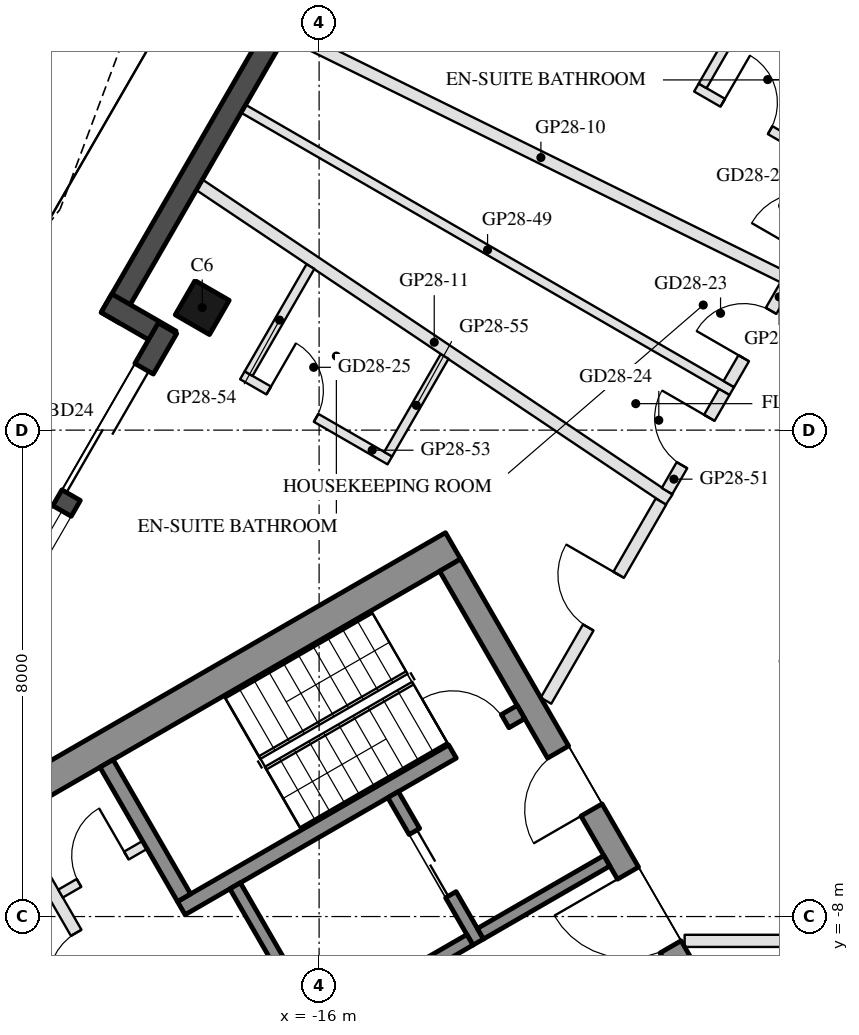
"""IFC4 building model, lengths in metres.
Left out: names, types, materials, properties, quantities, classifications, styles, units other than length and angle.
Written with IfcOpenShell. Run it as: python <this file> out.ifc"""

import sys

from ifc_helpers import new_model, si_unit, direction, frame, frame_2d, origin, origin_2d, place, context, subcontext, project, spatial, rectangle, hollow_rectangle, extrude, boolean, halfspace, element, fill, save


model = new_model("IFC4")
c1 = context("Model", 3, precision=1e-05, world=origin(), true_north=direction((0.0, 1.0)))
c2 = subcontext(c1, "Body", "Model", "MODEL_VIEW")
j1 = project(units=[si_unit("LENGTHUNIT", "METRE"), si_unit("PLANEANGLEUNIT", "RADIAN")], contexts=[c1])
p1 = place(None, origin())
s1 = spatial("IfcSite", under=j1, at=p1, CompositionType="ELEMENT")
p2 = place(p1, origin())
s2 = spatial("IfcBuilding", under=s1, at=p2, CompositionType="ELEMENT")
p3 = place(p2, frame((0.0, 0.0, 280.0)))
s3 = spatial("IfcBuildingStorey", under=s2, at=p3, CompositionType="ELEMENT", Elevation=280.0)
p4 = place(p3, frame((-17.922, 2.016, 0.0), z_axis=(0.0, 0.0, 1.0), x_axis=(0.5, 0.866025403784, 0.0)))
e1 = element("IfcColumn", 1, at=p4, inside=s3, PredefinedType="COLUMN", context=c2, shape_type="SweptSolid", body=[
    boolean("DIFFERENCE", extrude(hollow_rectangle(XDim=0.65, YDim=0.65, WallThickness=0.03, at=origin_2d()), origin(), (0.0, 0.0, 1.0), 3.7), halfspace(frame((0.0, 0.0, 0.04), z_axis=(0.0, 0.0, 1.0), x_axis=(1.0, 0.0, 0.0)), True)),
])
p5 = place(p3, frame((-14.925, 9.656, 0.0), z_axis=(0.0, 0.0, 1.0), x_axis=(-0.500018599098, -0.866014665324, 0.0)))
e2 = element("IfcWall", 2, at=p5, inside=s3, PredefinedType="SOLIDWALL", context=c2, shape_type="SweptSolid", body=[
    extrude(rectangle(XDim=9.015, YDim=0.35, at=frame_2d((4.508, 0.0))), origin(), (0.0, 0.0, 1.0), 3.55),
])
p6 = place(p5, frame((1.613, 0.0, 0.0)))
e3 = element("IfcOpeningElement", 3, at=p6, cuts=e2, PredefinedType="OPENING", context=c2, shape_type="SweptSolid", body=[
    extrude(rectangle(XDim=1.4, YDim=2.4, at=frame_2d((0.7, 1.2))), frame((0.0, 0.185, 0.0), z_axis=(0.0, -1.0, 0.0), x_axis=(1.0, 0.0, 0.0)), (0.0, 0.0, 1.0), 0.37),
])
p7 = place(p3, frame((-19.497, 2.088, 0.0), z_axis=(0.0, 0.0, 1.0), x_axis=(0.866005645448, -0.500034220881, 0.0)))
e4 = element("IfcWall", 4, at=p7, inside=s3, PredefinedType="SOLIDWALL", context=c2, shape_type="SweptSolid", body=[
    extrude(rectangle(XDim=1.22, YDim=0.35, at=frame_2d((0.61, 0.0))), origin(), (0.0, 0.0, 1.0), 3.55),
])
p8 = place(p3, frame((-18.493, 1.676, 0.0), z_axis=(0.0, 0.0, 1.0), x_axis=(-0.499985371027, -0.866033849661, 0.0)))
e5 = element("IfcWall", 5, at=p8, inside=s3, PredefinedType="SOLIDWALL", context=c2, shape_type="SweptSolid", body=[
    extrude(rectangle(XDim=6.055, YDim=0.35, at=frame_2d((3.028, 0.0))), origin(), (0.0, 0.0, 1.0), 3.55),
])
p9 = place(p8, frame((0.77, 0.0, 0.0)))
e6 = element("IfcOpeningElement", 6, at=p9, cuts=e5, PredefinedType="OPENING", context=c2, shape_type="SweptSolid", body=[
    extrude(rectangle(XDim=2.4, YDim=2.4, at=frame_2d((1.2, 1.2))), frame((0.0, 0.185, 0.0), z_axis=(0.0, -1.0, 0.0), x_axis=(1.0, 0.0, 0.0)), (0.0, 0.0, 1.0), 0.37),
])
p10 = place(p8, frame((3.47, 0.0, 0.3)))
e7 = element("IfcOpeningElement", 7, at=p10, cuts=e5, PredefinedType="OPENING", context=c2, shape_type="SweptSolid", body=[
    extrude(rectangle(XDim=2.2, YDim=2.65, at=frame_2d((1.1, 1.325))), frame((0.0, 0.185, 0.0), z_axis=(0.0, -1.0, 0.0), x_axis=(1.0, 0.0, 0.0)), (0.0, 0.0, 1.0), 0.37),
])
p11 = place(p3, frame((-13.797, -1.903, 0.0), z_axis=(0.0, 0.0, 1.0), x_axis=(-0.866024688907, -0.500001238203, 0.0)))
e8 = element("IfcWall", 8, at=p11, inside=s3, PredefinedType="SHEAR", context=c2, shape_type="SweptSolid", body=[
    extrude(rectangle(XDim=12.129, YDim=0.5, at=frame_2d((6.064, 0.0))), origin(), (0.0, 0.0, 1.0), 3.5),
])
p12 = place(p3, frame((-13.845, -2.22, 0.0), z_axis=(0.0, 0.0, 1.0), x_axis=(0.500004234368, -0.866022959057, 0.0)))
e9 = element("IfcWall", 9, at=p12, inside=s3, PredefinedType="SHEAR", context=c2, shape_type="SweptSolid", body=[
    extrude(rectangle(XDim=10.0, YDim=0.4, at=frame_2d((5.0, 0.0))), origin(), (0.0, 0.0, 1.0), 3.5),
])
p13 = place(p12, frame((3.55, 0.0, 0.0)))
e10 = element("IfcOpeningElement", 10, at=p13, cuts=e9, PredefinedType="OPENING", context=c2, shape_type="SweptSolid", body=[
    extrude(rectangle(XDim=1.1, YDim=2.1, at=frame_2d((0.55, 1.05))), frame((0.0, 0.21, 0.0), z_axis=(0.0, -1.0, 0.0), x_axis=(1.0, 0.0, 0.0)), (0.0, 0.0, 1.0), 0.42),
])
p14 = place(p12, frame((5.85, 0.0, 0.0)))
e11 = element("IfcOpeningElement", 11, at=p14, cuts=e9, PredefinedType="OPENING", context=c2, shape_type="SweptSolid", body=[
    extrude(rectangle(XDim=1.4, YDim=2.1, at=frame_2d((0.7, 1.05))), frame((0.0, 0.21, 0.0), z_axis=(0.0, -1.0, 0.0), x_axis=(1.0, 0.0, 0.0)), (0.0, 0.0, 1.0), 0.42),
])
p15 = place(p3, frame((-12.681, -4.636, 0.0), z_axis=(0.0, 0.0, 1.0), x_axis=(-0.866021702275, -0.500006411147, 0.0)))
e12 = element("IfcWall", 12, at=p15, inside=s3, PredefinedType="SHEAR", context=c2, shape_type="SweptSolid", body=[
    extrude(rectangle(XDim=6.45, YDim=0.25, at=frame_2d((3.225, 0.0))), origin(), (0.0, 0.0, 1.0), 3.5),
])
p16 = place(p15, frame((0.3, 0.0, 0.0)))
e13 = element("IfcOpeningElement", 13, at=p16, cuts=e12, PredefinedType="OPENING", context=c2, shape_type="SweptSolid", body=[
    extrude(rectangle(XDim=1.0, YDim=2.1, at=frame_2d((0.5, 1.05))), frame((0.0, 0.135, 0.0), z_axis=(0.0, -1.0, 0.0), x_axis=(1.0, 0.0, 0.0)), (0.0, 0.0, 1.0), 0.27),
])
p17 = place(p3, frame((-19.496, -5.482, 0.0), z_axis=(0.0, 0.0, 1.0), x_axis=(0.499990435942, -0.866030925526, 0.0)))
e14 = element("IfcWall", 14, at=p17, inside=s3, PredefinedType="SHEAR", context=c2, shape_type="SweptSolid", body=[
    extrude(rectangle(XDim=2.55, YDim=0.25, at=frame_2d((1.275, 0.0))), origin(), (0.0, 0.0, 1.0), 3.5),
])
p18 = place(p3, frame((-17.381, -7.495, 0.0), z_axis=(0.0, 0.0, 1.0), x_axis=(0.500011755427, -0.866018616679, 0.0)))
e15 = element("IfcWall", 15, at=p18, inside=s3, PredefinedType="SHEAR", context=c2, shape_type="SweptSolid", body=[
    extrude(rectangle(XDim=2.8, YDim=0.2, at=frame_2d((1.4, 0.0))), origin(), (0.0, 0.0, 1.0), 3.5),
])
p19 = place(p3, frame((-14.783, -5.995, 0.0), z_axis=(0.0, 0.0, 1.0), x_axis=(0.49994636267, -0.866056369097, 0.0)))
e16 = element("IfcWall", 16, at=p19, inside=s3, PredefinedType="SHEAR", context=c2, shape_type="SweptSolid", body=[
    extrude(rectangle(XDim=2.8, YDim=0.2, at=frame_2d((1.4, 0.0))), origin(), (0.0, 0.0, 1.0), 3.5),
])
p20 = place(p19, frame((0.7, 0.0, 0.0)))
e17 = element("IfcOpeningElement", 17, at=p20, cuts=e16, PredefinedType="OPENING", context=c2, shape_type="SweptSolid", body=[
    extrude(rectangle(XDim=1.2, YDim=2.1, at=frame_2d((0.6, 1.05))), frame((0.0, 0.11, 0.0), z_axis=(0.0, -1.0, 0.0), x_axis=(1.0, 0.0, 0.0)), (0.0, 0.0, 1.0), 0.22),
])
p21 = place(p3, frame((-13.52, -8.383, 0.0), z_axis=(0.0, 0.0, 1.0), x_axis=(-0.866034573852, -0.49998411664, 0.0)))
e18 = element("IfcWall", 18, at=p21, inside=s3, PredefinedType="SHEAR", context=c2, shape_type="SweptSolid", body=[
    extrude(rectangle(XDim=2.8, YDim=0.2, at=frame_2d((1.4, 0.0))), origin(), (0.0, 0.0, 1.0), 3.5),
])
p22 = place(p3, frame((-11.268, -7.083, 0.0), z_axis=(0.0, 0.0, 1.0), x_axis=(-0.866050077142, -0.499957262057, 0.0)))
e19 = element("IfcWall", 19, at=p22, inside=s3, PredefinedType="SHEAR", context=c2, shape_type="SweptSolid", body=[
    extrude(rectangle(XDim=2.4, YDim=0.2, at=frame_2d((1.2, 0.0))), origin(), (0.0, 0.0, 1.0), 3.5),
])
p23 = place(p3, frame((-21.076, -6.395, 0.0), z_axis=(0.0, 0.0, 1.0), x_axis=(0.50001468107, -0.866016927499, 0.0)))
e20 = element("IfcWall", 20, at=p23, inside=s3, PredefinedType="PARTITIONING", context=c2, shape_type="SweptSolid", body=[
    extrude(rectangle(XDim=5.4, YDim=0.2, at=frame_2d((2.7, 0.0))), origin(), (0.0, 0.0, 1.0), 3.5),
])
p24 = place(p23, frame((2.163, 0.0, 0.0)))
e21 = element("IfcOpeningElement", 21, at=p24, cuts=e20, PredefinedType="OPENING", context=c2, shape_type="SweptSolid", body=[
    extrude(rectangle(XDim=0.9, YDim=2.1, at=frame_2d((0.45, 1.05))), frame((0.0, 0.11, 0.0), z_axis=(0.0, -1.0, 0.0), x_axis=(1.0, 0.0, 0.0)), (0.0, 0.0, 1.0), 0.22),
])
p25 = place(p23, frame((4.038, 0.0, 0.0)))
e22 = element("IfcOpeningElement", 22, at=p25, cuts=e20, PredefinedType="OPENING", context=c2, shape_type="SweptSolid", body=[
    extrude(rectangle(XDim=0.9, YDim=2.1, at=frame_2d((0.45, 1.05))), frame((0.0, 0.11, 0.0), z_axis=(0.0, -1.0, 0.0), x_axis=(1.0, 0.0, 0.0)), (0.0, 0.0, 1.0), 0.22),
])
p26 = place(p3, frame((-18.866, -6.822, 0.0), z_axis=(0.0, 0.0, 1.0), x_axis=(-0.866028054938, -0.499995408039, 0.0)))
e23 = element("IfcWall", 23, at=p26, inside=s3, PredefinedType="PARTITIONING", context=c2, shape_type="SweptSolid", body=[
    extrude(rectangle(XDim=1.6, YDim=0.15, at=frame_2d((0.8, 0.0))), origin(), (0.0, 0.0, 1.0), 3.5),
])
p27 = place(p26, frame((0.35, 0.0, 0.0)))
e24 = element("IfcOpeningElement", 24, at=p27, cuts=e23, PredefinedType="OPENING", context=c2, shape_type="SweptSolid", body=[
    extrude(rectangle(XDim=0.9, YDim=2.1, at=frame_2d((0.45, 1.05))), frame((0.0, 0.085, 0.0), z_axis=(0.0, -1.0, 0.0), x_axis=(1.0, 0.0, 0.0)), (0.0, 0.0, 1.0), 0.17),
])
p28 = place(p3, frame((-13.444, 10.071, 0.0), z_axis=(0.0, 0.0, 1.0), x_axis=(0.866030795796, -0.499990660646, 0.0)))
e25 = element("IfcWall", 25, at=p28, inside=s3, PredefinedType="PARTITIONING", context=c2, shape_type="SweptSolid", body=[
    extrude(rectangle(XDim=8.379, YDim=0.2, at=frame_2d((4.189, 0.0))), origin(), (0.0, 0.0, 1.0), 3.16),
])
p29 = place(p3, frame((-16.524, 6.538, 0.0), z_axis=(0.0, 0.0, 1.0), x_axis=(0.897120251728, -0.441786434762, 0.0)))
e26 = element("IfcWall", 26, at=p29, inside=s3, PredefinedType="PARTITIONING", context=c2, shape_type="SweptSolid", body=[
    extrude(rectangle(XDim=9.299, YDim=0.2, at=frame_2d((4.649, 0.0))), origin(), (0.0, 0.0, 1.0), 3.16),
])
p30 = place(p3, frame((-17.969, 4.035, 0.0), z_axis=(0.0, 0.0, 1.0), x_axis=(0.830560992963, -0.556927676604, 0.0)))
e27 = element("IfcWall", 27, at=p30, inside=s3, PredefinedType="PARTITIONING", context=c2, shape_type="SweptSolid", body=[
    extrude(rectangle(XDim=9.3, YDim=0.2, at=frame_2d((4.65, 0.0))), origin(), (0.0, 0.0, 1.0), 3.16),
])
p31 = place(p3, frame((-5.0, -8.4, 0.0), z_axis=(0.0, 0.0, 1.0), x_axis=(-1.0, 0.0, 0.0)))
e28 = element("IfcWall", 28, at=p31, inside=s3, PredefinedType="PARTITIONING", context=c2, shape_type="SweptSolid", body=[
    extrude(rectangle(XDim=4.988, YDim=0.2, at=frame_2d((2.494, 0.0))), origin(), (0.0, 0.0, 1.0), 3.05),
])
p32 = place(p31, frame((2.05, 0.0, 0.0)))
e29 = element("IfcOpeningElement", 29, at=p32, cuts=e28, PredefinedType="OPENING", context=c2, shape_type="SweptSolid", body=[
    extrude(rectangle(XDim=1.0, YDim=2.1, at=frame_2d((0.5, 1.05))), frame((0.0, 0.11, 0.0), z_axis=(0.0, -1.0, 0.0), x_axis=(1.0, 0.0, 0.0)), (0.0, 0.0, 1.0), 0.22),
])
p33 = place(p3, frame((-9.795, 5.634, 0.0), z_axis=(0.0, 0.0, 1.0), x_axis=(0.866034573852, -0.49998411664, 0.0)))
e30 = element("IfcWall", 30, at=p33, inside=s3, PredefinedType="PARTITIONING", context=c2, shape_type="SweptSolid", body=[
    extrude(rectangle(XDim=2.8, YDim=0.15, at=frame_2d((1.4, 0.0))), origin(), (0.0, 0.0, 1.0), 3.05),
])
p34 = place(p33, frame((0.5, 0.0, 0.0)))
e31 = element("IfcOpeningElement", 31, at=p34, cuts=e30, PredefinedType="OPENING", context=c2, shape_type="SweptSolid", body=[
    extrude(rectangle(XDim=0.9, YDim=2.1, at=frame_2d((0.45, 1.05))), frame((0.0, 0.085, 0.0), z_axis=(0.0, -1.0, 0.0), x_axis=(1.0, 0.0, 0.0)), (0.0, 0.0, 1.0), 0.17),
])
p35 = place(p3, frame((-8.771, 7.258, 0.0), z_axis=(0.0, 0.0, 1.0), x_axis=(-0.50002820729, -0.866009117685, 0.0)))
e32 = element("IfcWall", 32, at=p35, inside=s3, PredefinedType="PARTITIONING", context=c2, shape_type="SweptSolid", body=[
    extrude(rectangle(XDim=1.843, YDim=0.15, at=frame_2d((0.922, 0.0))), origin(), (0.0, 0.0, 1.0), 3.05),
])
p36 = place(p3, frame((-17.246, 5.286, 0.0), z_axis=(0.0, 0.0, 1.0), x_axis=(0.865746766399, -0.500482303853, 0.0)))
e33 = element("IfcWall", 33, at=p36, inside=s3, PredefinedType="PARTITIONING", context=c2, shape_type="SweptSolid", body=[
    extrude(rectangle(XDim=9.279, YDim=0.15, at=frame_2d((4.639, 0.0))), origin(), (0.0, 0.0, 1.0), 3.16),
])
p37 = place(p3, frame((-9.262, 0.758, 0.0), z_axis=(0.0, 0.0, 1.0), x_axis=(0.500074377092, 0.865982457891, 0.0)))
e34 = element("IfcWall", 34, at=p37, inside=s3, PredefinedType="PARTITIONING", context=c2, shape_type="SweptSolid", body=[
    extrude(rectangle(XDim=1.882, YDim=0.2, at=frame_2d((0.941, 0.0))), origin(), (0.0, 0.0, 1.0), 3.05),
])
p38 = place(p37, frame((0.491, 0.0, 0.0)))
e35 = element("IfcOpeningElement", 35, at=p38, cuts=e34, PredefinedType="OPENING", context=c2, shape_type="SweptSolid", body=[
    extrude(rectangle(XDim=0.9, YDim=2.1, at=frame_2d((0.45, 1.05))), frame((0.0, 0.11, 0.0), z_axis=(0.0, -1.0, 0.0), x_axis=(1.0, 0.0, 0.0)), (0.0, 0.0, 1.0), 0.22),
])
p39 = place(p3, frame((-10.278, -1.002, 0.0), z_axis=(0.0, 0.0, 1.0), x_axis=(0.499977061294, 0.866038647048, 0.0)))
e36 = element("IfcWall", 36, at=p39, inside=s3, PredefinedType="PARTITIONING", context=c2, shape_type="SweptSolid", body=[
    extrude(rectangle(XDim=1.881, YDim=0.2, at=frame_2d((0.941, 0.0))), origin(), (0.0, 0.0, 1.0), 3.55),
])
p40 = place(p39, frame((0.491, 0.0, 0.0)))
e37 = element("IfcOpeningElement", 37, at=p40, cuts=e36, PredefinedType="OPENING", context=c2, shape_type="SweptSolid", body=[
    extrude(rectangle(XDim=0.9, YDim=2.1, at=frame_2d((0.45, 1.05))), frame((0.0, 0.11, 0.0), z_axis=(0.0, -1.0, 0.0), x_axis=(1.0, 0.0, 0.0)), (0.0, 0.0, 1.0), 0.22),
])
p41 = place(p3, frame((-12.269, -4.45, 0.0), z_axis=(0.0, 0.0, 1.0), x_axis=(0.500000040646, 0.866025380318, 0.0)))
e38 = element("IfcWall", 38, at=p41, inside=s3, PredefinedType="PARTITIONING", context=c2, shape_type="SweptSolid", body=[
    extrude(rectangle(XDim=3.781, YDim=0.2, at=frame_2d((1.891, 0.0))), origin(), (0.0, 0.0, 1.0), 3.05),
])
p42 = place(p41, frame((1.391, 0.0, 0.0)))
e39 = element("IfcOpeningElement", 39, at=p42, cuts=e38, PredefinedType="OPENING", context=c2, shape_type="SweptSolid", body=[
    extrude(rectangle(XDim=1.0, YDim=2.1, at=frame_2d((0.5, 1.05))), frame((0.0, 0.11, 0.0), z_axis=(0.0, -1.0, 0.0), x_axis=(1.0, 0.0, 0.0)), (0.0, 0.0, 1.0), 0.22),
])
p43 = place(p3, frame((-17.262, 0.902, 0.0), z_axis=(0.0, 0.0, 1.0), x_axis=(0.866034573852, -0.49998411664, 0.0)))
e40 = element("IfcWall", 40, at=p43, inside=s3, PredefinedType="PARTITIONING", context=c2, shape_type="SweptSolid", body=[
    extrude(rectangle(XDim=2.8, YDim=0.15, at=frame_2d((1.4, 0.0))), origin(), (0.0, 0.0, 1.0), 3.55),
])
p44 = place(p43, frame((0.5, 0.0, 0.0)))
e41 = element("IfcOpeningElement", 41, at=p44, cuts=e40, PredefinedType="OPENING", context=c2, shape_type="SweptSolid", body=[
    extrude(rectangle(XDim=0.9, YDim=2.1, at=frame_2d((0.45, 1.05))), frame((0.0, 0.085, 0.0), z_axis=(0.0, -1.0, 0.0), x_axis=(1.0, 0.0, 0.0)), (0.0, 0.0, 1.0), 0.17),
])
p45 = place(p3, frame((-16.143, 2.69, 0.0), z_axis=(0.0, 0.0, 1.0), x_axis=(-0.500013496215, -0.866017611601, 0.0)))
e42 = element("IfcWall", 42, at=p45, inside=s3, PredefinedType="PARTITIONING", context=c2, shape_type="SweptSolid", body=[
    extrude(rectangle(XDim=2.033, YDim=0.15, at=frame_2d((1.017, 0.0))), origin(), (0.0, 0.0, 1.0), 3.05),
])
p46 = place(p3, frame((-13.937, 1.211, 0.0), z_axis=(0.0, 0.0, 1.0), x_axis=(-0.500003477455, -0.866023396066, 0.0)))
e43 = element("IfcWall", 43, at=p46, inside=s3, PredefinedType="PARTITIONING", context=c2, shape_type="SweptSolid", body=[
    extrude(rectangle(XDim=1.855, YDim=0.15, at=frame_2d((0.927, 0.0))), origin(), (0.0, 0.0, 1.0), 3.05),
])
p47 = place(p9, frame((2.4, 0.0, 0.0), z_axis=(0.0, 0.0, 1.0), x_axis=(-1.0, 0.0, 0.0)))
e44 = element("IfcDoor", 44, at=p47, inside=s3, OperationType="SLIDING_TO_LEFT", PredefinedType="DOOR", context=c2, shape_type="SweptSolid", body=[
    extrude(rectangle(XDim=2.4, YDim=2.4, at=frame_2d((1.2, 1.2))), frame((0.0, 0.025, 0.0), z_axis=(0.0, -1.0, 0.0), x_axis=(1.0, 0.0, 0.0)), (0.0, 0.0, 1.0), 0.05),
])
fill(e6, e44)
p48 = place(p10, origin())
e45 = element("IfcWindow", 45, at=p48, inside=s3, PartitioningType="SINGLE_PANEL", PredefinedType="WINDOW", context=c2, shape_type="SweptSolid", body=[
    extrude(rectangle(XDim=2.2, YDim=2.65, at=frame_2d((1.1, 1.325))), frame((0.0, 0.03, 0.0), z_axis=(0.0, -1.0, 0.0), x_axis=(1.0, 0.0, 0.0)), (0.0, 0.0, 1.0), 0.06),
])
fill(e7, e45)
p49 = place(p20, origin())
e46 = element("IfcDoor", 46, at=p49, inside=s3, OperationType="DOUBLE_DOOR_SLIDING", PredefinedType="DOOR", context=c2, shape_type="SweptSolid", body=[
    extrude(rectangle(XDim=1.2, YDim=2.1, at=frame_2d((0.6, 1.05))), frame((0.0, 0.025, 0.0), z_axis=(0.0, -1.0, 0.0), x_axis=(1.0, 0.0, 0.0)), (0.0, 0.0, 1.0), 0.05),
])
fill(e17, e46)
p50 = place(p27, frame((0.9, 0.0, 0.0), z_axis=(0.0, 0.0, 1.0), x_axis=(-1.0, 0.0, 0.0)))
e47 = element("IfcDoor", 47, at=p50, inside=s3, OperationType="SINGLE_SWING_RIGHT", PredefinedType="DOOR", context=c2, shape_type="SweptSolid", body=[
    extrude(rectangle(XDim=0.9, YDim=2.1, at=frame_2d((0.45, 1.05))), frame((0.0, 0.025, 0.0), z_axis=(0.0, -1.0, 0.0), x_axis=(1.0, 0.0, 0.0)), (0.0, 0.0, 1.0), 0.05),
])
fill(e24, e47)
p51 = place(p24, frame((0.9, 0.0, 0.0), z_axis=(0.0, 0.0, 1.0), x_axis=(-1.0, 0.0, 0.0)))
e48 = element("IfcDoor", 48, at=p51, inside=s3, OperationType="SINGLE_SWING_LEFT", PredefinedType="DOOR", context=c2, shape_type="SweptSolid", body=[
    extrude(rectangle(XDim=0.9, YDim=2.1, at=frame_2d((0.45, 1.05))), frame((0.0, 0.025, 0.0), z_axis=(0.0, -1.0, 0.0), x_axis=(1.0, 0.0, 0.0)), (0.0, 0.0, 1.0), 0.05),
])
fill(e21, e48)
p52 = place(p13, frame((1.1, 0.0, 0.0), z_axis=(0.0, 0.0, 1.0), x_axis=(-1.0, 0.0, 0.0)))
e49 = element("IfcDoor", 49, at=p52, inside=s3, OperationType="SINGLE_SWING_LEFT", PredefinedType="DOOR", context=c2, shape_type="SweptSolid", body=[
    extrude(rectangle(XDim=1.1, YDim=2.1, at=frame_2d((0.55, 1.05))), frame((0.0, 0.025, 0.0), z_axis=(0.0, -1.0, 0.0), x_axis=(1.0, 0.0, 0.0)), (0.0, 0.0, 1.0), 0.05),
])
fill(e10, e49)
p53 = place(p14, frame((1.4, 0.0, 0.0), z_axis=(0.0, 0.0, 1.0), x_axis=(-1.0, 0.0, 0.0)))
e50 = element("IfcDoor", 50, at=p53, inside=s3, OperationType="DOUBLE_DOOR_SINGLE_SWING", PredefinedType="DOOR", context=c2, shape_type="SweptSolid", body=[
    extrude(rectangle(XDim=1.4, YDim=2.1, at=frame_2d((0.7, 1.05))), frame((0.0, 0.025, 0.0), z_axis=(0.0, -1.0, 0.0), x_axis=(1.0, 0.0, 0.0)), (0.0, 0.0, 1.0), 0.05),
])
fill(e11, e50)
p54 = place(p16, frame((1.0, 0.0, 0.0), z_axis=(0.0, 0.0, 1.0), x_axis=(-1.0, 0.0, 0.0)))
e51 = element("IfcDoor", 51, at=p54, inside=s3, OperationType="SINGLE_SWING_LEFT", PredefinedType="DOOR", context=c2, shape_type="SweptSolid", body=[
    extrude(rectangle(XDim=1.0, YDim=2.1, at=frame_2d((0.5, 1.05))), frame((0.0, 0.025, 0.0), z_axis=(0.0, -1.0, 0.0), x_axis=(1.0, 0.0, 0.0)), (0.0, 0.0, 1.0), 0.05),
])
fill(e13, e51)
p55 = place(p34, origin())
e52 = element("IfcDoor", 52, at=p55, inside=s3, OperationType="SINGLE_SWING_LEFT", PredefinedType="DOOR", context=c2, shape_type="SweptSolid", body=[
    extrude(rectangle(XDim=0.9, YDim=2.1, at=frame_2d((0.45, 1.05))), frame((0.0, 0.025, 0.0), z_axis=(0.0, -1.0, 0.0), x_axis=(1.0, 0.0, 0.0)), (0.0, 0.0, 1.0), 0.05),
])
fill(e31, e52)
p56 = place(p38, origin())
e53 = element("IfcDoor", 53, at=p56, inside=s3, OperationType="SINGLE_SWING_LEFT", PredefinedType="DOOR", context=c2, shape_type="SweptSolid", body=[
    extrude(rectangle(XDim=0.9, YDim=2.1, at=frame_2d((0.45, 1.05))), frame((0.0, 0.025, 0.0), z_axis=(0.0, -1.0, 0.0), x_axis=(1.0, 0.0, 0.0)), (0.0, 0.0, 1.0), 0.05),
])
fill(e35, e53)
p57 = place(p40, origin())
e54 = element("IfcDoor", 54, at=p57, inside=s3, OperationType="SINGLE_SWING_RIGHT", PredefinedType="DOOR", context=c2, shape_type="SweptSolid", body=[
    extrude(rectangle(XDim=0.9, YDim=2.1, at=frame_2d((0.45, 1.05))), frame((0.0, 0.025, 0.0), z_axis=(0.0, -1.0, 0.0), x_axis=(1.0, 0.0, 0.0)), (0.0, 0.0, 1.0), 0.05),
])
fill(e37, e54)
p58 = place(p44, origin())
e55 = element("IfcDoor", 55, at=p58, inside=s3, OperationType="SINGLE_SWING_LEFT", PredefinedType="DOOR", context=c2, shape_type="SweptSolid", body=[
    extrude(rectangle(XDim=0.9, YDim=2.1, at=frame_2d((0.45, 1.05))), frame((0.0, 0.025, 0.0), z_axis=(0.0, -1.0, 0.0), x_axis=(1.0, 0.0, 0.0)), (0.0, 0.0, 1.0), 0.05),
])
fill(e41, e55)
p59 = place(p42, origin())
e56 = element("IfcDoor", 56, at=p59, inside=s3, OperationType="SINGLE_SWING_RIGHT", PredefinedType="DOOR", context=c2, shape_type="SweptSolid", body=[
    extrude(rectangle(XDim=1.0, YDim=2.1, at=frame_2d((0.5, 1.05))), frame((0.0, 0.025, 0.0), z_axis=(0.0, -1.0, 0.0), x_axis=(1.0, 0.0, 0.0)), (0.0, 0.0, 1.0), 0.05),
])
fill(e39, e56)
save(model, sys.argv[1])
